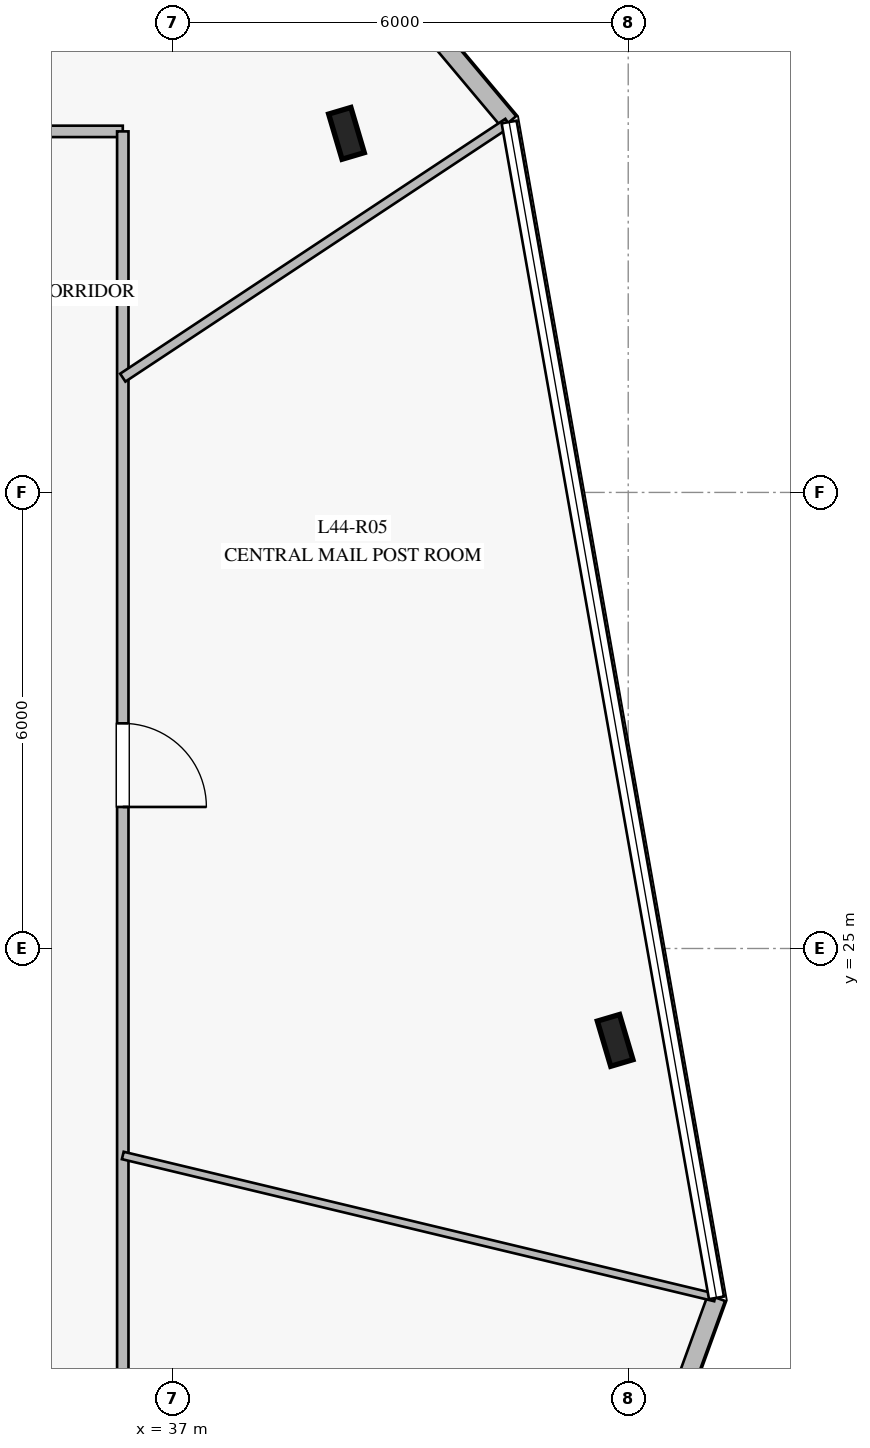
"""IFC4 building model, lengths in metres.
Left out: names, types, materials, properties, quantities, classifications, styles, units other than length and angle.
Written with IfcOpenShell. Run it as: python <this file> out.ifc"""

import sys

from ifc_helpers import new_model, si_unit, direction, frame, frame_2d, origin, origin_2d, place, context, subcontext, project, spatial, rectangle, i_section, extrude, element, fill, save


model = new_model("IFC4")
c1 = context("Model", 3, precision=1e-05, world=origin(), true_north=direction((0.0, 1.0)))
c2 = subcontext(c1, "Body", "Model", "MODEL_VIEW")
j1 = project(units=[si_unit("LENGTHUNIT", "METRE"), si_unit("PLANEANGLEUNIT", "RADIAN")], contexts=[c1])
p1 = place(None, origin())
s1 = spatial("IfcSite", under=j1, at=p1, CompositionType="ELEMENT")
p2 = place(p1, origin())
s2 = spatial("IfcBuilding", under=s1, at=p2, CompositionType="ELEMENT")
p3 = place(p2, frame((0.0, 0.0, 184.8)))
s3 = spatial("IfcBuildingStorey", under=s2, at=p3, CompositionType="ELEMENT", Elevation=184.8)
for number, where, z_axis, x_axis in (
    (1, (42.828, 23.791, 0.0), (0.0, 0.0, 1.0), (-0.284, 0.959, 0.0)),
    (2, (39.293, 35.724, 0.0), (0.0, 0.0, 1.0), (-0.284, 0.959, 0.0)),
):
    element("IfcColumn", number, at=place(p3, frame(where, z_axis=z_axis, x_axis=x_axis)), inside=s3, PredefinedType="COLUMN", context=c2, shape_type="SweptSolid", body=[
        extrude(i_section(OverallWidth=0.305, OverallDepth=0.62, WebThickness=0.021, FlangeThickness=0.04, at=origin_2d()), origin(), (0.0, 0.0, 1.0), 4.0),
    ])
p4 = place(p3, frame((42.633, 16.204, 0.0), z_axis=(0.0, 0.0, 1.0), x_axis=(0.341857099862, 0.939751947736, 0.0)))
e3 = element("IfcWall", 3, at=p4, inside=s3, PredefinedType="STANDARD", context=c2, shape_type="SweptSolid", body=[
    extrude(rectangle(XDim=4.469, YDim=0.24, at=frame_2d((2.235, 0.0))), origin(), (0.0, 0.0, 1.0), 3.78),
])
p5 = place(p3, frame((41.433, 35.873, 0.0), z_axis=(0.0, 0.0, 1.0), x_axis=(-0.642889570515, 0.765958876261, 0.0)))
e4 = element("IfcWall", 4, at=p5, inside=s3, PredefinedType="STANDARD", context=c2, shape_type="SweptSolid", body=[
    extrude(rectangle(XDim=4.468, YDim=0.24, at=frame_2d((2.234, 0.0))), origin(), (0.0, 0.0, 1.0), 3.78),
])
p6 = place(p3, frame((13.65, 35.75, 0.0), z_axis=(0.0, 0.0, 1.0), x_axis=(1.0, 0.0, 0.0)))
e5 = element("IfcWall", 5, at=p6, inside=s3, PredefinedType="PARTITIONING", context=c2, shape_type="SweptSolid", body=[
    extrude(rectangle(XDim=22.7, YDim=0.15, at=frame_2d((11.35, 0.0))), origin(), (0.0, 0.0, 1.0), 3.05),
])
p7 = place(p6, frame((17.327, 0.0, 0.0)))
e6 = element("IfcOpeningElement", 6, at=p7, cuts=e5, PredefinedType="OPENING", context=c2, shape_type="SweptSolid", body=[
    extrude(rectangle(XDim=1.1, YDim=2.2, at=frame_2d((0.55, 1.1))), frame((0.0, 0.085, 0.0), z_axis=(0.0, -1.0, 0.0), x_axis=(1.0, 0.0, 0.0)), (0.0, 0.0, 1.0), 0.17),
])
p8 = place(p6, frame((8.575, 0.0, 0.0)))
e7 = element("IfcOpeningElement", 7, at=p8, cuts=e5, PredefinedType="OPENING", context=c2, shape_type="SweptSolid", body=[
    extrude(rectangle(XDim=1.1, YDim=2.2, at=frame_2d((0.55, 1.1))), frame((0.0, 0.085, 0.0), z_axis=(0.0, -1.0, 0.0), x_axis=(1.0, 0.0, 0.0)), (0.0, 0.0, 1.0), 0.17),
])
p9 = place(p6, frame((1.958, 0.0, 0.0)))
e8 = element("IfcOpeningElement", 8, at=p9, cuts=e5, PredefinedType="OPENING", context=c2, shape_type="SweptSolid", body=[
    extrude(rectangle(XDim=1.1, YDim=2.2, at=frame_2d((0.55, 1.1))), frame((0.0, 0.085, 0.0), z_axis=(0.0, -1.0, 0.0), x_axis=(1.0, 0.0, 0.0)), (0.0, 0.0, 1.0), 0.17),
])
p10 = place(p3, frame((36.35, 35.75, 0.0), z_axis=(0.0, 0.0, 1.0), x_axis=(0.0, -1.0, 0.0)))
e9 = element("IfcWall", 9, at=p10, inside=s3, PredefinedType="PARTITIONING", context=c2, shape_type="SweptSolid", body=[
    extrude(rectangle(XDim=21.5, YDim=0.15, at=frame_2d((10.75, 0.0))), origin(), (0.0, 0.0, 1.0), 3.05),
])
p11 = place(p10, frame((16.672, 0.0, 0.0)))
e10 = element("IfcOpeningElement", 10, at=p11, cuts=e9, PredefinedType="OPENING", context=c2, shape_type="SweptSolid", body=[
    extrude(rectangle(XDim=1.1, YDim=2.2, at=frame_2d((0.55, 1.1))), frame((0.0, 0.085, 0.0), z_axis=(0.0, -1.0, 0.0), x_axis=(1.0, 0.0, 0.0)), (0.0, 0.0, 1.0), 0.17),
])
p12 = place(p10, frame((7.788, 0.0, 0.0)))
e11 = element("IfcOpeningElement", 11, at=p12, cuts=e9, PredefinedType="OPENING", context=c2, shape_type="SweptSolid", body=[
    extrude(rectangle(XDim=1.1, YDim=2.2, at=frame_2d((0.55, 1.1))), frame((0.0, 0.085, 0.0), z_axis=(0.0, -1.0, 0.0), x_axis=(1.0, 0.0, 0.0)), (0.0, 0.0, 1.0), 0.17),
])
p13 = place(p3, frame((36.35, 22.277, 0.0), z_axis=(0.0, 0.0, 1.0), x_axis=(0.972420475655, -0.233234685514, 0.0)))
e12 = element("IfcWall", 12, at=p13, inside=s3, PredefinedType="MOVABLE", context=c2, shape_type="SweptSolid", body=[
    extrude(rectangle(XDim=8.014, YDim=0.1, at=frame_2d((4.007, 0.0))), origin(), (0.0, 0.0, 1.0), 3.18),
])
p14 = place(p3, frame((36.35, 32.51, 0.0), z_axis=(0.0, 0.0, 1.0), x_axis=(0.833986040468, 0.551785541949, 0.0)))
e13 = element("IfcWall", 13, at=p14, inside=s3, PredefinedType="PARTITIONING", context=c2, shape_type="SweptSolid", body=[
    extrude(rectangle(XDim=6.077, YDim=0.125, at=frame_2d((3.038, 0.0))), origin(), (0.0, 0.0, 1.0), 3.18),
])
p15 = place(p12, origin())
e14 = element("IfcDoor", 14, at=p15, inside=s3, OperationType="SINGLE_SWING_RIGHT", PredefinedType="DOOR", context=c2, shape_type="SweptSolid", body=[
    extrude(rectangle(XDim=1.1, YDim=2.2, at=frame_2d((0.55, 1.1))), frame((0.0, 0.025, 0.0), z_axis=(0.0, -1.0, 0.0), x_axis=(1.0, 0.0, 0.0)), (0.0, 0.0, 1.0), 0.05),
])
fill(e11, e14)
save(model, sys.argv[1])
